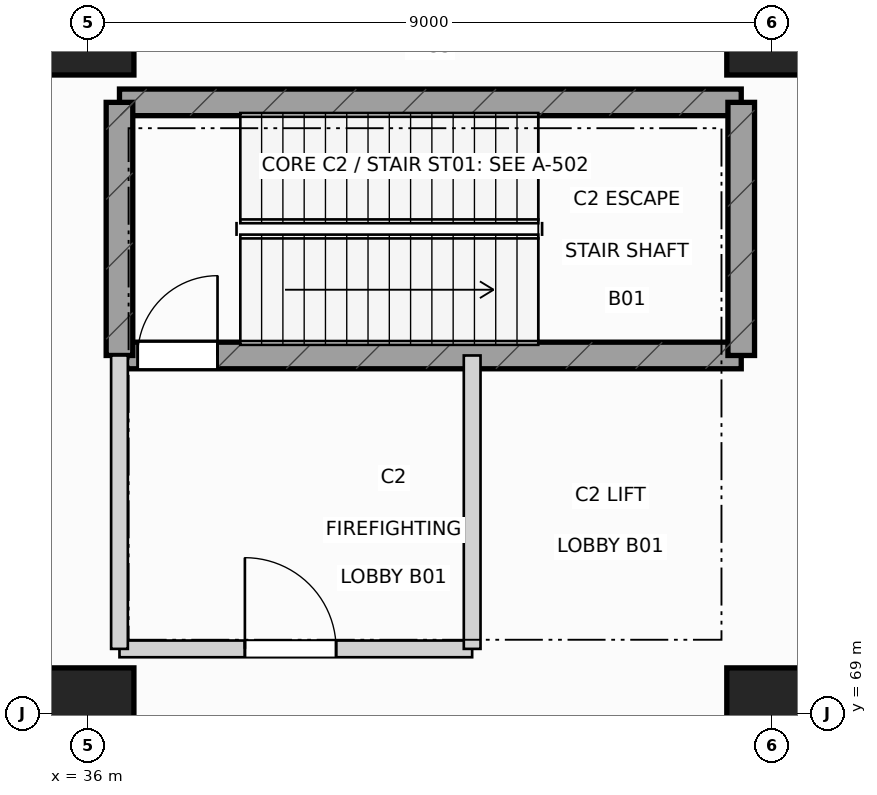
"""IFC4 building model, lengths in metres.
Left out: names, types, materials, properties, quantities, classifications, styles, units other than length and angle.
Written with IfcOpenShell. Run it as: python <this file> out.ifc"""

import sys

from ifc_helpers import new_model, si_unit, direction, frame, frame_2d, origin, origin_2d, place, context, subcontext, project, spatial, rectangle, extrude, element, fill, save


model = new_model("IFC4")
c1 = context("Model", 3, precision=1e-05, world=origin(), true_north=direction((0.0, 1.0)))
c2 = subcontext(c1, "Body", "Model", "MODEL_VIEW")
j1 = project(units=[si_unit("LENGTHUNIT", "METRE"), si_unit("PLANEANGLEUNIT", "RADIAN")], contexts=[c1])
p1 = place(None, origin())
s1 = spatial("IfcSite", under=j1, at=p1, CompositionType="ELEMENT")
p2 = place(p1, origin())
s2 = spatial("IfcBuilding", under=s1, at=p2, CompositionType="ELEMENT")
p3 = place(p2, frame((0.0, 0.0, -5.4)))
s3 = spatial("IfcBuildingStorey", under=s2, at=p3, CompositionType="ELEMENT", Elevation=-5.4)
for number, where, z_axis, x_axis in (
    (1, (36.0, 69.0, 0.0), (0.0, 0.0, 1.0), (1.0, 0.0, 0.0)),
    (2, (36.0, 78.0, 0.0), (0.0, 0.0, 1.0), (1.0, 0.0, 0.0)),
    (3, (45.0, 69.0, 0.0), (0.0, 0.0, 1.0), (1.0, 0.0, 0.0)),
    (4, (45.0, 78.0, 0.0), (0.0, 0.0, 1.0), (1.0, 0.0, 0.0)),
):
    element("IfcColumn", number, at=place(p3, frame(where, z_axis=z_axis, x_axis=x_axis)), inside=s3, PredefinedType="COLUMN", context=c2, shape_type="SweptSolid", body=[
        extrude(rectangle(XDim=1.2, YDim=1.2, at=origin_2d()), origin(), (0.0, 0.0, 1.0), 5.4),
    ])
p4 = place(p3, frame((36.41, 73.71, 0.0), z_axis=(0.0, 0.0, 1.0), x_axis=(1.0, 0.0, 0.0)))
e5 = element("IfcWall", 5, at=p4, inside=s3, PredefinedType="SHEAR", context=c2, shape_type="SweptSolid", body=[
    extrude(rectangle(XDim=8.18, YDim=0.35, at=frame_2d((4.09, 0.0))), origin(), (0.0, 0.0, 1.0), 5.08),
])
p5 = place(p4, frame((0.24, 0.0, 0.0)))
e6 = element("IfcOpeningElement", 6, at=p5, cuts=e5, PredefinedType="OPENING", context=c2, shape_type="SweptSolid", body=[
    extrude(rectangle(XDim=1.05, YDim=2.18, at=frame_2d((0.525, 1.09))), frame((0.0, 0.185, 0.0), z_axis=(0.0, -1.0, 0.0), x_axis=(1.0, 0.0, 0.0)), (0.0, 0.0, 1.0), 0.37),
])
p6 = place(p3, frame((36.41, 77.04, 0.0), z_axis=(0.0, 0.0, 1.0), x_axis=(1.0, 0.0, 0.0)))
e7 = element("IfcWall", 7, at=p6, inside=s3, PredefinedType="SHEAR", context=c2, shape_type="SweptSolid", body=[
    extrude(rectangle(XDim=8.18, YDim=0.35, at=frame_2d((4.09, 0.0))), origin(), (0.0, 0.0, 1.0), 5.08),
])
for number, where, z_axis, x_axis in (
    (8, (36.41, 73.71, 0.0), (0.0, 0.0, 1.0), (0.0, 1.0, 0.0)),
    (9, (44.59, 73.71, 0.0), (0.0, 0.0, 1.0), (0.0, 1.0, 0.0)),
):
    element("IfcWall", number, at=place(p3, frame(where, z_axis=z_axis, x_axis=x_axis)), inside=s3, PredefinedType="SHEAR", context=c2, shape_type="SweptSolid", body=[
        extrude(rectangle(XDim=3.33, YDim=0.35, at=frame_2d((1.665, 0.0))), origin(), (0.0, 0.0, 1.0), 5.08),
    ])
p7 = place(p3, frame((36.41, 69.85, 0.0), z_axis=(0.0, 0.0, 1.0), x_axis=(1.0, 0.0, 0.0)))
e10 = element("IfcWall", 10, at=p7, inside=s3, PredefinedType="PARTITIONING", context=c2, shape_type="SweptSolid", body=[
    extrude(rectangle(XDim=4.64, YDim=0.22, at=frame_2d((2.32, 0.0))), origin(), (0.0, 0.0, 1.0), 4.715),
])
p8 = place(p7, frame((1.65, 0.0, 0.0)))
e11 = element("IfcOpeningElement", 11, at=p8, cuts=e10, PredefinedType="OPENING", context=c2, shape_type="SweptSolid", body=[
    extrude(rectangle(XDim=1.2, YDim=2.18, at=frame_2d((0.6, 1.09))), frame((0.0, 0.12, 0.0), z_axis=(0.0, -1.0, 0.0), x_axis=(1.0, 0.0, 0.0)), (0.0, 0.0, 1.0), 0.24),
])
p9 = place(p3, frame((36.41, 69.85, 0.0), z_axis=(0.0, 0.0, 1.0), x_axis=(0.0, 1.0, 0.0)))
e12 = element("IfcWall", 12, at=p9, inside=s3, PredefinedType="PARTITIONING", context=c2, shape_type="SweptSolid", body=[
    extrude(rectangle(XDim=3.86, YDim=0.22, at=frame_2d((1.93, 0.0))), origin(), (0.0, 0.0, 1.0), 4.715),
])
p10 = place(p3, frame((41.05, 69.85, 0.0), z_axis=(0.0, 0.0, 1.0), x_axis=(0.0, 1.0, 0.0)))
e13 = element("IfcWall", 13, at=p10, inside=s3, PredefinedType="PARTITIONING", context=c2, shape_type="SweptSolid", body=[
    extrude(rectangle(XDim=3.86, YDim=0.22, at=frame_2d((1.93, 0.0))), origin(), (0.0, 0.0, 1.0), 4.745),
])
p11 = place(p5, origin())
e14 = element("IfcDoor", 14, at=p11, inside=s3, OperationType="SINGLE_SWING_RIGHT", PredefinedType="DOOR", context=c2, shape_type="SweptSolid", body=[
    extrude(rectangle(XDim=1.05, YDim=2.18, at=frame_2d((0.525, 1.09))), frame((0.0, 0.025, 0.0), z_axis=(0.0, -1.0, 0.0), x_axis=(1.0, 0.0, 0.0)), (0.0, 0.0, 1.0), 0.05),
])
fill(e6, e14)
p12 = place(p8, origin())
e15 = element("IfcDoor", 15, at=p12, inside=s3, OperationType="SINGLE_SWING_LEFT", PredefinedType="DOOR", context=c2, shape_type="SweptSolid", body=[
    extrude(rectangle(XDim=1.2, YDim=2.18, at=frame_2d((0.6, 1.09))), frame((0.0, 0.025, 0.0), z_axis=(0.0, -1.0, 0.0), x_axis=(1.0, 0.0, 0.0)), (0.0, 0.0, 1.0), 0.05),
])
fill(e11, e15)
save(model, sys.argv[1])
